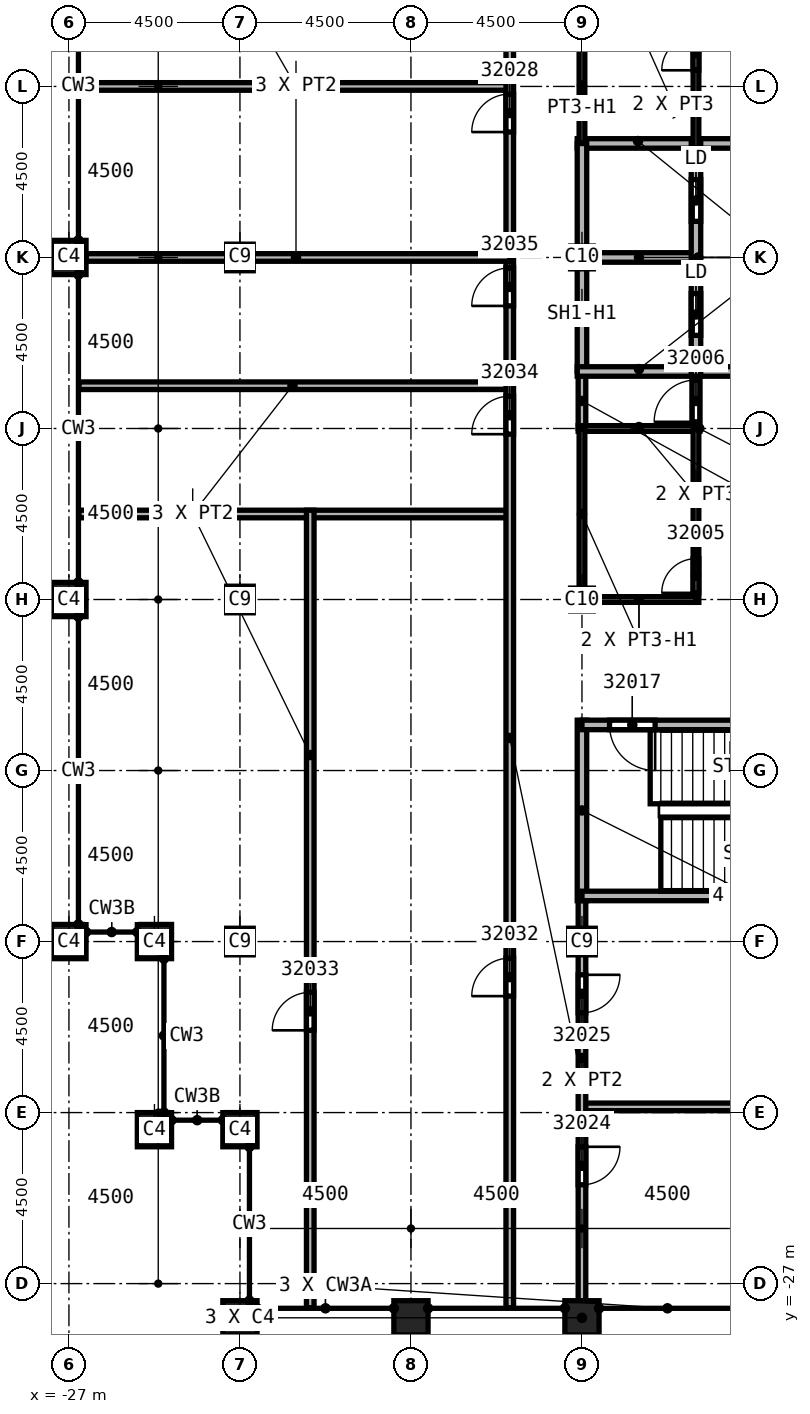
"""IFC4 building model, lengths in metres.
Left out: names, types, materials, properties, quantities, classifications, styles, units other than length and angle.
Written with IfcOpenShell. Run it as: python <this file> out.ifc"""

import sys

from ifc_helpers import new_model, si_unit, direction, frame, frame_2d, origin, origin_2d, place, context, subcontext, project, spatial, rectangle, extrude, element, fill, save


model = new_model("IFC4")
c1 = context("Model", 3, precision=1e-05, world=origin(), true_north=direction((0.0, 1.0)))
c2 = subcontext(c1, "Body", "Model", "MODEL_VIEW")
j1 = project(units=[si_unit("LENGTHUNIT", "METRE"), si_unit("PLANEANGLEUNIT", "RADIAN")], contexts=[c1])
p1 = place(None, origin())
s1 = spatial("IfcSite", under=j1, at=p1, CompositionType="ELEMENT")
p2 = place(p1, origin())
s2 = spatial("IfcBuilding", under=s1, at=p2, CompositionType="ELEMENT")
p3 = place(p2, frame((0.0, 0.0, 356.0)))
s3 = spatial("IfcBuildingStorey", under=s2, at=p3, CompositionType="ELEMENT", Elevation=356.0)
for number, where, z_axis, x_axis in (
    (1, (-13.5, -18.0, 0.0), (0.0, 0.0, 1.0), (1.0, 0.0, 0.0)),
    (2, (-22.5, 0.0, 0.0), (0.0, 0.0, 1.0), (1.0, 0.0, 0.0)),
    (3, (-22.5, -9.0, 0.0), (0.0, 0.0, 1.0), (1.0, 0.0, 0.0)),
    (4, (-22.5, -18.0, 0.0), (0.0, 0.0, 1.0), (1.0, 0.0, 0.0)),
):
    element("IfcColumn", number, at=place(p3, frame(where, z_axis=z_axis, x_axis=x_axis)), inside=s3, PredefinedType="COLUMN", context=c2, shape_type="SweptSolid", body=[
        extrude(rectangle(XDim=0.7, YDim=0.7, at=origin_2d()), origin(), (0.0, 0.0, 1.0), 4.6),
    ])
for number, where, z_axis, x_axis in (
    (5, (-13.5, 0.0, 0.0), (0.0, 0.0, 1.0), (1.0, 0.0, 0.0)),
    (6, (-13.5, -9.0, 0.0), (0.0, 0.0, 1.0), (1.0, 0.0, 0.0)),
):
    element("IfcColumn", number, at=place(p3, frame(where, z_axis=z_axis, x_axis=x_axis)), inside=s3, PredefinedType="COLUMN", context=c2, shape_type="SweptSolid", body=[
        extrude(rectangle(XDim=0.6, YDim=0.6, at=origin_2d()), origin(), (0.0, 0.0, 1.0), 4.6),
    ])
for number, where, z_axis, x_axis in (
    (7, (-13.5, -27.9, 0.0), (0.0, 0.0, 1.0), (1.0, 0.0, 0.0)),
    (8, (-18.0, -27.9, 0.0), (0.0, 0.0, 1.0), (1.0, 0.0, 0.0)),
    (9, (-22.5, -27.9, 0.0), (0.0, 0.0, 1.0), (1.0, 0.0, 0.0)),
    (10, (-27.0, 0.0, 0.0), (0.0, 0.0, 1.0), (0.0, 1.0, 0.0)),
    (11, (-27.0, -9.0, 0.0), (0.0, 0.0, 1.0), (0.0, 1.0, 0.0)),
    (12, (-27.0, -18.0, 0.0), (0.0, 0.0, 1.0), (0.0, 1.0, 0.0)),
    (13, (-22.5, -22.95, 0.0), (0.0, 0.0, 1.0), (1.0, 0.0, 0.0)),
    (14, (-24.75, -22.95, 0.0), (0.0, 0.0, 1.0), (1.0, 0.0, 0.0)),
    (15, (-24.75, -18.0, 0.0), (0.0, 0.0, 1.0), (1.0, 0.0, 0.0)),
):
    element("IfcColumn", number, at=place(p3, frame(where, z_axis=z_axis, x_axis=x_axis)), inside=s3, PredefinedType="COLUMN", context=c2, shape_type="SweptSolid", body=[
        extrude(rectangle(XDim=0.9, YDim=0.9, at=origin_2d()), origin(), (0.0, 0.0, 1.0), 4.6),
    ])
for number, where, z_axis, x_axis in (
    (16, (-26.736, -6.75, 0.0), (0.0, 0.0, 1.0), (1.0, 0.0, 0.0)),
    (17, (-26.736, -3.375, 0.0), (0.0, 0.0, 1.0), (1.0, 0.0, 0.0)),
):
    element("IfcWall", number, at=place(p3, frame(where, z_axis=z_axis, x_axis=x_axis)), inside=s3, PredefinedType="PARTITIONING", context=c2, shape_type="SweptSolid", body=[
        extrude(rectangle(XDim=11.336, YDim=0.2, at=frame_2d((5.668, 0.0))), origin(), (0.0, 0.0, 1.0), 4.15),
    ])
p4 = place(p3, frame((-26.55, 4.5, 0.0), z_axis=(0.0, 0.0, 1.0), x_axis=(1.0, 0.0, 0.0)))
e18 = element("IfcWall", 18, at=p4, inside=s3, PredefinedType="PARTITIONING", context=c2, shape_type="SweptSolid", body=[
    extrude(rectangle(XDim=11.15, YDim=0.2, at=frame_2d((5.575, 0.0))), origin(), (0.0, 0.0, 1.0), 4.15),
])
p5 = place(p3, frame((-20.65, -27.636, 0.0), z_axis=(0.0, 0.0, 1.0), x_axis=(0.0, 1.0, 0.0)))
e19 = element("IfcWall", 19, at=p5, inside=s3, PredefinedType="PARTITIONING", context=c2, shape_type="SweptSolid", body=[
    extrude(rectangle(XDim=20.986, YDim=0.2, at=frame_2d((10.493, 0.0))), origin(), (0.0, 0.0, 1.0), 4.15),
])
p6 = place(p5, frame((7.3, 0.0, 0.0)))
e20 = element("IfcOpeningElement", 20, at=p6, cuts=e19, PredefinedType="OPENING", context=c2, shape_type="SweptSolid", body=[
    extrude(rectangle(XDim=1.0, YDim=2.1, at=frame_2d((0.5, 1.05))), frame((0.0, 0.1, 0.0), z_axis=(0.0, -1.0, 0.0), x_axis=(1.0, 0.0, 0.0)), (0.0, 0.0, 1.0), 0.2),
])
p7 = place(p3, frame((-15.4, -27.636, 0.0), z_axis=(0.0, 0.0, 1.0), x_axis=(0.0, 1.0, 0.0)))
e21 = element("IfcWall", 21, at=p7, inside=s3, PredefinedType="PARTITIONING", context=c2, shape_type="SweptSolid", body=[
    extrude(rectangle(XDim=41.236, YDim=0.2, at=frame_2d((20.618, 0.0))), origin(), (0.0, 0.0, 1.0), 4.15),
])
p8 = place(p7, frame((30.936, 0.0, 0.0)))
e22 = element("IfcOpeningElement", 22, at=p8, cuts=e21, PredefinedType="OPENING", context=c2, shape_type="SweptSolid", body=[
    extrude(rectangle(XDim=1.0, YDim=2.1, at=frame_2d((0.5, 1.05))), frame((0.0, 0.1, 0.0), z_axis=(0.0, -1.0, 0.0), x_axis=(1.0, 0.0, 0.0)), (0.0, 0.0, 1.0), 0.2),
])
p9 = place(p7, frame((34.836, 0.0, 0.0)))
e23 = element("IfcOpeningElement", 23, at=p9, cuts=e21, PredefinedType="OPENING", context=c2, shape_type="SweptSolid", body=[
    extrude(rectangle(XDim=1.0, YDim=2.1, at=frame_2d((0.5, 1.05))), frame((0.0, 0.1, 0.0), z_axis=(0.0, -1.0, 0.0), x_axis=(1.0, 0.0, 0.0)), (0.0, 0.0, 1.0), 0.2),
])
p10 = place(p7, frame((8.2, 0.0, 0.0)))
e24 = element("IfcOpeningElement", 24, at=p10, cuts=e21, PredefinedType="OPENING", context=c2, shape_type="SweptSolid", body=[
    extrude(rectangle(XDim=1.0, YDim=2.1, at=frame_2d((0.5, 1.05))), frame((0.0, 0.1, 0.0), z_axis=(0.0, -1.0, 0.0), x_axis=(1.0, 0.0, 0.0)), (0.0, 0.0, 1.0), 0.2),
])
p11 = place(p7, frame((22.986, 0.0, 0.0)))
e25 = element("IfcOpeningElement", 25, at=p11, cuts=e21, PredefinedType="OPENING", context=c2, shape_type="SweptSolid", body=[
    extrude(rectangle(XDim=1.0, YDim=2.1, at=frame_2d((0.5, 1.05))), frame((0.0, 0.1, 0.0), z_axis=(0.0, -1.0, 0.0), x_axis=(1.0, 0.0, 0.0)), (0.0, 0.0, 1.0), 0.2),
])
p12 = place(p7, frame((26.361, 0.0, 0.0)))
e26 = element("IfcOpeningElement", 26, at=p12, cuts=e21, PredefinedType="OPENING", context=c2, shape_type="SweptSolid", body=[
    extrude(rectangle(XDim=1.0, YDim=2.1, at=frame_2d((0.5, 1.05))), frame((0.0, 0.1, 0.0), z_axis=(0.0, -1.0, 0.0), x_axis=(1.0, 0.0, 0.0)), (0.0, 0.0, 1.0), 0.2),
])
p13 = place(p3, frame((-15.4, 0.0, 0.0), z_axis=(0.0, 0.0, 1.0), x_axis=(-1.0, 0.0, 0.0)))
e27 = element("IfcWall", 27, at=p13, inside=s3, PredefinedType="PARTITIONING", context=c2, shape_type="SweptSolid", body=[
    extrude(rectangle(XDim=11.15, YDim=0.2, at=frame_2d((5.575, 0.0))), origin(), (0.0, 0.0, 1.0), 4.15),
])
p14 = place(p3, frame((-13.5, -22.35, 0.0), z_axis=(0.0, 0.0, 1.0), x_axis=(1.0, 0.0, 0.0)))
e28 = element("IfcWall", 28, at=p14, inside=s3, PredefinedType="PARTITIONING", context=c2, shape_type="SweptSolid", body=[
    extrude(rectangle(XDim=10.5, YDim=0.2, at=frame_2d((5.25, 0.0))), origin(), (0.0, 0.0, 1.0), 4.15),
])
p15 = place(p3, frame((-13.5, -16.675, 0.0), z_axis=(0.0, 0.0, 1.0), x_axis=(0.0, -1.0, 0.0)))
e29 = element("IfcWall", 29, at=p15, inside=s3, PredefinedType="PARTITIONING", context=c2, shape_type="SweptSolid", body=[
    extrude(rectangle(XDim=10.775, YDim=0.2, at=frame_2d((5.387, 0.0))), origin(), (0.0, 0.0, 1.0), 4.15),
])
p16 = place(p15, frame((6.725, 0.0, 0.0)))
e30 = element("IfcOpeningElement", 30, at=p16, cuts=e29, PredefinedType="OPENING", context=c2, shape_type="SweptSolid", body=[
    extrude(rectangle(XDim=1.0, YDim=2.1, at=frame_2d((0.5, 1.05))), frame((0.0, 0.1, 0.0), z_axis=(0.0, -1.0, 0.0), x_axis=(1.0, 0.0, 0.0)), (0.0, 0.0, 1.0), 0.2),
])
p17 = place(p15, frame((2.2, 0.0, 0.0)))
e31 = element("IfcOpeningElement", 31, at=p17, cuts=e29, PredefinedType="OPENING", context=c2, shape_type="SweptSolid", body=[
    extrude(rectangle(XDim=1.0, YDim=2.1, at=frame_2d((0.5, 1.05))), frame((0.0, 0.1, 0.0), z_axis=(0.0, -1.0, 0.0), x_axis=(1.0, 0.0, 0.0)), (0.0, 0.0, 1.0), 0.2),
])
p18 = place(p3, frame((-13.5, -4.5, 0.0), z_axis=(0.0, 0.0, 1.0), x_axis=(0.0, 1.0, 0.0)))
e32 = element("IfcWall", 32, at=p18, inside=s3, PredefinedType="SOLIDWALL", context=c2, shape_type="SweptSolid", body=[
    extrude(rectangle(XDim=1.5, YDim=0.2, at=frame_2d((0.75, 0.0))), origin(), (0.0, 0.0, 1.0), 3.838),
])
p19 = place(p3, frame((-10.5, -4.575, 0.0), z_axis=(0.0, 0.0, 1.0), x_axis=(0.0, 1.0, 0.0)))
e33 = element("IfcWall", 33, at=p19, inside=s3, PredefinedType="SOLIDWALL", context=c2, shape_type="SweptSolid", body=[
    extrude(rectangle(XDim=1.7, YDim=0.2, at=frame_2d((0.85, 0.0))), origin(), (0.0, 0.0, 1.0), 4.15),
])
p20 = place(p19, frame((0.25, 0.0, 0.0)))
e34 = element("IfcOpeningElement", 34, at=p20, cuts=e33, PredefinedType="OPENING", context=c2, shape_type="SweptSolid", body=[
    extrude(rectangle(XDim=1.1, YDim=2.1, at=frame_2d((0.55, 1.05))), frame((0.0, 0.1, 0.0), z_axis=(0.0, -1.0, 0.0), x_axis=(1.0, 0.0, 0.0)), (0.0, 0.0, 1.0), 0.2),
])
p21 = place(p3, frame((-13.625, 0.0, 0.0), z_axis=(0.0, 0.0, 1.0), x_axis=(1.0, 0.0, 0.0)))
e35 = element("IfcWall", 35, at=p21, inside=s3, PredefinedType="SOLIDWALL", context=c2, shape_type="SweptSolid", body=[
    extrude(rectangle(XDim=3.125, YDim=0.25, at=frame_2d((1.562, 0.0))), origin(), (0.0, 0.0, 1.0), 4.15),
])
p22 = place(p3, frame((-13.625, 3.0, 0.0), z_axis=(0.0, 0.0, 1.0), x_axis=(1.0, 0.0, 0.0)))
e36 = element("IfcWall", 36, at=p22, inside=s3, PredefinedType="SOLIDWALL", context=c2, shape_type="SweptSolid", body=[
    extrude(rectangle(XDim=6.125, YDim=0.25, at=frame_2d((3.062, 0.0))), origin(), (0.0, 0.0, 1.0), 4.15),
])
p23 = place(p22, frame((4.75, 0.0, 0.0)))
e37 = element("IfcOpeningElement", 37, at=p23, cuts=e36, PredefinedType="OPENING", context=c2, shape_type="SweptSolid", body=[
    extrude(rectangle(XDim=1.1, YDim=2.1, at=frame_2d((0.55, 1.05))), frame((0.0, 0.125, 0.0), z_axis=(0.0, -1.0, 0.0), x_axis=(1.0, 0.0, 0.0)), (0.0, 0.0, 1.0), 0.25),
])
p24 = place(p3, frame((-13.5, -3.0, 0.0), z_axis=(0.0, 0.0, 1.0), x_axis=(0.0, 1.0, 0.0)))
e38 = element("IfcWall", 38, at=p24, inside=s3, PredefinedType="SOLIDWALL", context=c2, shape_type="SweptSolid", body=[
    extrude(rectangle(XDim=6.0, YDim=0.25, at=frame_2d((3.0, 0.0))), origin(), (0.0, 0.0, 1.0), 3.838),
])
p25 = place(p3, frame((-13.625, -3.0, 0.0), z_axis=(0.0, 0.0, 1.0), x_axis=(1.0, 0.0, 0.0)))
e39 = element("IfcWall", 39, at=p25, inside=s3, PredefinedType="SOLIDWALL", context=c2, shape_type="SweptSolid", body=[
    extrude(rectangle(XDim=6.125, YDim=0.25, at=frame_2d((3.062, 0.0))), origin(), (0.0, 0.0, 1.0), 4.15),
])
p26 = place(p25, frame((4.75, 0.0, 0.0)))
e40 = element("IfcOpeningElement", 40, at=p26, cuts=e39, PredefinedType="OPENING", context=c2, shape_type="SweptSolid", body=[
    extrude(rectangle(XDim=1.1, YDim=2.1, at=frame_2d((0.55, 1.05))), frame((0.0, 0.125, 0.0), z_axis=(0.0, -1.0, 0.0), x_axis=(1.0, 0.0, 0.0)), (0.0, 0.0, 1.0), 0.25),
])
p27 = place(p3, frame((-10.5, -3.125, 0.0), z_axis=(0.0, 0.0, 1.0), x_axis=(0.0, 1.0, 0.0)))
e41 = element("IfcWall", 41, at=p27, inside=s3, PredefinedType="SOLIDWALL", context=c2, shape_type="SweptSolid", body=[
    extrude(rectangle(XDim=6.25, YDim=0.25, at=frame_2d((3.125, 0.0))), origin(), (0.0, 0.0, 1.0), 4.15),
])
p28 = place(p27, frame((1.075, 0.0, 0.0)))
e42 = element("IfcOpeningElement", 42, at=p28, cuts=e41, PredefinedType="OPENING", context=c2, shape_type="SweptSolid", body=[
    extrude(rectangle(XDim=1.1, YDim=2.1, at=frame_2d((0.55, 1.05))), frame((0.0, 0.125, 0.0), z_axis=(0.0, -1.0, 0.0), x_axis=(1.0, 0.0, 0.0)), (0.0, 0.0, 1.0), 0.25),
])
p29 = place(p27, frame((4.075, 0.0, 0.0)))
e43 = element("IfcOpeningElement", 43, at=p29, cuts=e41, PredefinedType="OPENING", context=c2, shape_type="SweptSolid", body=[
    extrude(rectangle(XDim=1.1, YDim=2.1, at=frame_2d((0.55, 1.05))), frame((0.0, 0.125, 0.0), z_axis=(0.0, -1.0, 0.0), x_axis=(1.0, 0.0, 0.0)), (0.0, 0.0, 1.0), 0.25),
])
p30 = place(p3, frame((-13.5, -12.175, 0.0), z_axis=(0.0, 0.0, 1.0), x_axis=(0.0, -1.0, 0.0)))
e44 = element("IfcWall", 44, at=p30, inside=s3, PredefinedType="SOLIDWALL", context=c2, shape_type="SweptSolid", body=[
    extrude(rectangle(XDim=4.75, YDim=0.25, at=frame_2d((2.375, 0.0))), origin(), (0.0, 0.0, 1.0), 4.15),
])
p31 = place(p3, frame((-4.4, -16.8, 0.0), z_axis=(0.0, 0.0, 1.0), x_axis=(-1.0, 0.0, 0.0)))
e45 = element("IfcWall", 45, at=p31, inside=s3, PredefinedType="SOLIDWALL", context=c2, shape_type="SweptSolid", body=[
    extrude(rectangle(XDim=9.1, YDim=0.25, at=frame_2d((4.55, 0.0))), origin(), (0.0, 0.0, 1.0), 4.15),
])
p32 = place(p3, frame((-4.375, -12.3, 0.0), z_axis=(0.0, 0.0, 1.0), x_axis=(-1.0, 0.0, 0.0)))
e46 = element("IfcWall", 46, at=p32, inside=s3, PredefinedType="SOLIDWALL", context=c2, shape_type="SweptSolid", body=[
    extrude(rectangle(XDim=9.125, YDim=0.25, at=frame_2d((4.562, 0.0))), origin(), (0.0, 0.0, 1.0), 4.15),
])
p33 = place(p32, frame((7.2, 0.0, 0.0)))
e47 = element("IfcOpeningElement", 47, at=p33, cuts=e46, PredefinedType="OPENING", context=c2, shape_type="SweptSolid", body=[
    extrude(rectangle(XDim=1.2, YDim=2.1, at=frame_2d((0.6, 1.05))), frame((0.0, 0.125, 0.0), z_axis=(0.0, -1.0, 0.0), x_axis=(1.0, 0.0, 0.0)), (0.0, 0.0, 1.0), 0.25),
])
p34 = place(p3, frame((-13.6, -4.5, 0.0), z_axis=(0.0, 0.0, 1.0), x_axis=(1.0, 0.0, 0.0)))
e48 = element("IfcWall", 48, at=p34, inside=s3, PredefinedType="PARTITIONING", context=c2, shape_type="SweptSolid", body=[
    extrude(rectangle(XDim=3.1, YDim=0.15, at=frame_2d((1.55, 0.0))), origin(), (0.0, 0.0, 1.0), 4.15),
])
p35 = place(p3, frame((-13.5, -9.075, 0.0), z_axis=(0.0, 0.0, 1.0), x_axis=(0.0, 1.0, 0.0)))
e49 = element("IfcWall", 49, at=p35, inside=s3, PredefinedType="PARTITIONING", context=c2, shape_type="SweptSolid", body=[
    extrude(rectangle(XDim=4.575, YDim=0.15, at=frame_2d((2.288, 0.0))), origin(), (0.0, 0.0, 1.0), 3.838),
])
p36 = place(p3, frame((-13.5, 3.0, 0.0), z_axis=(0.0, 0.0, 1.0), x_axis=(0.0, 1.0, 0.0)))
e50 = element("IfcWall", 50, at=p36, inside=s3, PredefinedType="PARTITIONING", context=c2, shape_type="SweptSolid", body=[
    extrude(rectangle(XDim=3.0, YDim=0.15, at=frame_2d((1.5, 0.0))), origin(), (0.0, 0.0, 1.0), 3.838),
])
p37 = place(p3, frame((-10.5, -9.075, 0.0), z_axis=(0.0, 0.0, 1.0), x_axis=(0.0, 1.0, 0.0)))
e51 = element("IfcWall", 51, at=p37, inside=s3, PredefinedType="PARTITIONING", context=c2, shape_type="SweptSolid", body=[
    extrude(rectangle(XDim=4.65, YDim=0.15, at=frame_2d((2.325, 0.0))), origin(), (0.0, 0.0, 1.0), 4.15),
])
p38 = place(p37, frame((0.25, 0.0, 0.0)))
e52 = element("IfcOpeningElement", 52, at=p38, cuts=e51, PredefinedType="OPENING", context=c2, shape_type="SweptSolid", body=[
    extrude(rectangle(XDim=0.9, YDim=2.1, at=frame_2d((0.45, 1.05))), frame((0.0, 0.075, 0.0), z_axis=(0.0, -1.0, 0.0), x_axis=(1.0, 0.0, 0.0)), (0.0, 0.0, 1.0), 0.15),
])
p39 = place(p3, frame((-10.5, -9.0, 0.0), z_axis=(0.0, 0.0, 1.0), x_axis=(-1.0, 0.0, 0.0)))
e53 = element("IfcWall", 53, at=p39, inside=s3, PredefinedType="PARTITIONING", context=c2, shape_type="SweptSolid", body=[
    extrude(rectangle(XDim=3.0, YDim=0.15, at=frame_2d((1.5, 0.0))), origin(), (0.0, 0.0, 1.0), 3.838),
])
p40 = place(p3, frame((-10.5, 2.875, 0.0), z_axis=(0.0, 0.0, 1.0), x_axis=(0.0, 1.0, 0.0)))
e54 = element("IfcWall", 54, at=p40, inside=s3, PredefinedType="PARTITIONING", context=c2, shape_type="SweptSolid", body=[
    extrude(rectangle(XDim=3.2, YDim=0.15, at=frame_2d((1.6, 0.0))), origin(), (0.0, 0.0, 1.0), 4.15),
])
p41 = place(p40, frame((2.05, 0.0, 0.0)))
e55 = element("IfcOpeningElement", 55, at=p41, cuts=e54, PredefinedType="OPENING", context=c2, shape_type="SweptSolid", body=[
    extrude(rectangle(XDim=0.9, YDim=2.1, at=frame_2d((0.45, 1.05))), frame((0.0, 0.075, 0.0), z_axis=(0.0, -1.0, 0.0), x_axis=(1.0, 0.0, 0.0)), (0.0, 0.0, 1.0), 0.15),
])
p42 = place(p38, origin())
e56 = element("IfcDoor", 56, at=p42, inside=s3, OperationType="SINGLE_SWING_RIGHT", PredefinedType="DOOR", context=c2, shape_type="SweptSolid", body=[
    extrude(rectangle(XDim=0.9, YDim=2.1, at=frame_2d((0.45, 1.05))), frame((0.0, 0.025, 0.0), z_axis=(0.0, -1.0, 0.0), x_axis=(1.0, 0.0, 0.0)), (0.0, 0.0, 1.0), 0.05),
])
fill(e52, e56)
p43 = place(p20, origin())
e57 = element("IfcDoor", 57, at=p43, inside=s3, OperationType="SINGLE_SWING_LEFT", PredefinedType="DOOR", context=c2, shape_type="SweptSolid", body=[
    extrude(rectangle(XDim=1.1, YDim=2.1, at=frame_2d((0.55, 1.05))), frame((0.0, 0.025, 0.0), z_axis=(0.0, -1.0, 0.0), x_axis=(1.0, 0.0, 0.0)), (0.0, 0.0, 1.0), 0.05),
])
fill(e34, e57)
p44 = place(p41, origin())
e58 = element("IfcDoor", 58, at=p44, inside=s3, OperationType="SINGLE_SWING_RIGHT", PredefinedType="DOOR", context=c2, shape_type="SweptSolid", body=[
    extrude(rectangle(XDim=0.9, YDim=2.1, at=frame_2d((0.45, 1.05))), frame((0.0, 0.025, 0.0), z_axis=(0.0, -1.0, 0.0), x_axis=(1.0, 0.0, 0.0)), (0.0, 0.0, 1.0), 0.05),
])
fill(e55, e58)
p45 = place(p33, origin())
e59 = element("IfcDoor", 59, at=p45, inside=s3, OperationType="SINGLE_SWING_RIGHT", PredefinedType="DOOR", context=c2, shape_type="SweptSolid", body=[
    extrude(rectangle(XDim=1.2, YDim=2.1, at=frame_2d((0.6, 1.05))), frame((0.0, 0.025, 0.0), z_axis=(0.0, -1.0, 0.0), x_axis=(1.0, 0.0, 0.0)), (0.0, 0.0, 1.0), 0.05),
])
fill(e47, e59)
p46 = place(p16, origin())
e60 = element("IfcDoor", 60, at=p46, inside=s3, OperationType="SINGLE_SWING_LEFT", PredefinedType="DOOR", context=c2, shape_type="SweptSolid", body=[
    extrude(rectangle(XDim=1.0, YDim=2.1, at=frame_2d((0.5, 1.05))), frame((0.0, 0.025, 0.0), z_axis=(0.0, -1.0, 0.0), x_axis=(1.0, 0.0, 0.0)), (0.0, 0.0, 1.0), 0.05),
])
fill(e30, e60)
p47 = place(p17, origin())
e61 = element("IfcDoor", 61, at=p47, inside=s3, OperationType="SINGLE_SWING_RIGHT", PredefinedType="DOOR", context=c2, shape_type="SweptSolid", body=[
    extrude(rectangle(XDim=1.0, YDim=2.1, at=frame_2d((0.5, 1.05))), frame((0.0, 0.025, 0.0), z_axis=(0.0, -1.0, 0.0), x_axis=(1.0, 0.0, 0.0)), (0.0, 0.0, 1.0), 0.05),
])
fill(e31, e61)
p48 = place(p8, origin())
e62 = element("IfcDoor", 62, at=p48, inside=s3, OperationType="SINGLE_SWING_LEFT", PredefinedType="DOOR", context=c2, shape_type="SweptSolid", body=[
    extrude(rectangle(XDim=1.0, YDim=2.1, at=frame_2d((0.5, 1.05))), frame((0.0, 0.025, 0.0), z_axis=(0.0, -1.0, 0.0), x_axis=(1.0, 0.0, 0.0)), (0.0, 0.0, 1.0), 0.05),
])
fill(e22, e62)
p49 = place(p10, origin())
e63 = element("IfcDoor", 63, at=p49, inside=s3, OperationType="SINGLE_SWING_LEFT", PredefinedType="DOOR", context=c2, shape_type="SweptSolid", body=[
    extrude(rectangle(XDim=1.0, YDim=2.1, at=frame_2d((0.5, 1.05))), frame((0.0, 0.025, 0.0), z_axis=(0.0, -1.0, 0.0), x_axis=(1.0, 0.0, 0.0)), (0.0, 0.0, 1.0), 0.05),
])
fill(e24, e63)
p50 = place(p6, origin())
e64 = element("IfcDoor", 64, at=p50, inside=s3, OperationType="SINGLE_SWING_RIGHT", PredefinedType="DOOR", context=c2, shape_type="SweptSolid", body=[
    extrude(rectangle(XDim=1.0, YDim=2.1, at=frame_2d((0.5, 1.05))), frame((0.0, 0.025, 0.0), z_axis=(0.0, -1.0, 0.0), x_axis=(1.0, 0.0, 0.0)), (0.0, 0.0, 1.0), 0.05),
])
fill(e20, e64)
p51 = place(p11, origin())
e65 = element("IfcDoor", 65, at=p51, inside=s3, OperationType="SINGLE_SWING_LEFT", PredefinedType="DOOR", context=c2, shape_type="SweptSolid", body=[
    extrude(rectangle(XDim=1.0, YDim=2.1, at=frame_2d((0.5, 1.05))), frame((0.0, 0.025, 0.0), z_axis=(0.0, -1.0, 0.0), x_axis=(1.0, 0.0, 0.0)), (0.0, 0.0, 1.0), 0.05),
])
fill(e25, e65)
p52 = place(p12, origin())
e66 = element("IfcDoor", 66, at=p52, inside=s3, OperationType="SINGLE_SWING_RIGHT", PredefinedType="DOOR", context=c2, shape_type="SweptSolid", body=[
    extrude(rectangle(XDim=1.0, YDim=2.1, at=frame_2d((0.5, 1.05))), frame((0.0, 0.025, 0.0), z_axis=(0.0, -1.0, 0.0), x_axis=(1.0, 0.0, 0.0)), (0.0, 0.0, 1.0), 0.05),
])
fill(e26, e66)
p53 = place(p28, origin())
e67 = element("IfcDoor", 67, at=p53, inside=s3, OperationType="SLIDING_TO_LEFT", PredefinedType="DOOR", context=c2, shape_type="SweptSolid", body=[
    extrude(rectangle(XDim=1.1, YDim=2.1, at=frame_2d((0.55, 1.05))), frame((0.0, 0.025, 0.0), z_axis=(0.0, -1.0, 0.0), x_axis=(1.0, 0.0, 0.0)), (0.0, 0.0, 1.0), 0.05),
])
fill(e42, e67)
p54 = place(p29, origin())
e68 = element("IfcDoor", 68, at=p54, inside=s3, OperationType="SLIDING_TO_LEFT", PredefinedType="DOOR", context=c2, shape_type="SweptSolid", body=[
    extrude(rectangle(XDim=1.1, YDim=2.1, at=frame_2d((0.55, 1.05))), frame((0.0, 0.025, 0.0), z_axis=(0.0, -1.0, 0.0), x_axis=(1.0, 0.0, 0.0)), (0.0, 0.0, 1.0), 0.05),
])
fill(e43, e68)
save(model, sys.argv[1])
